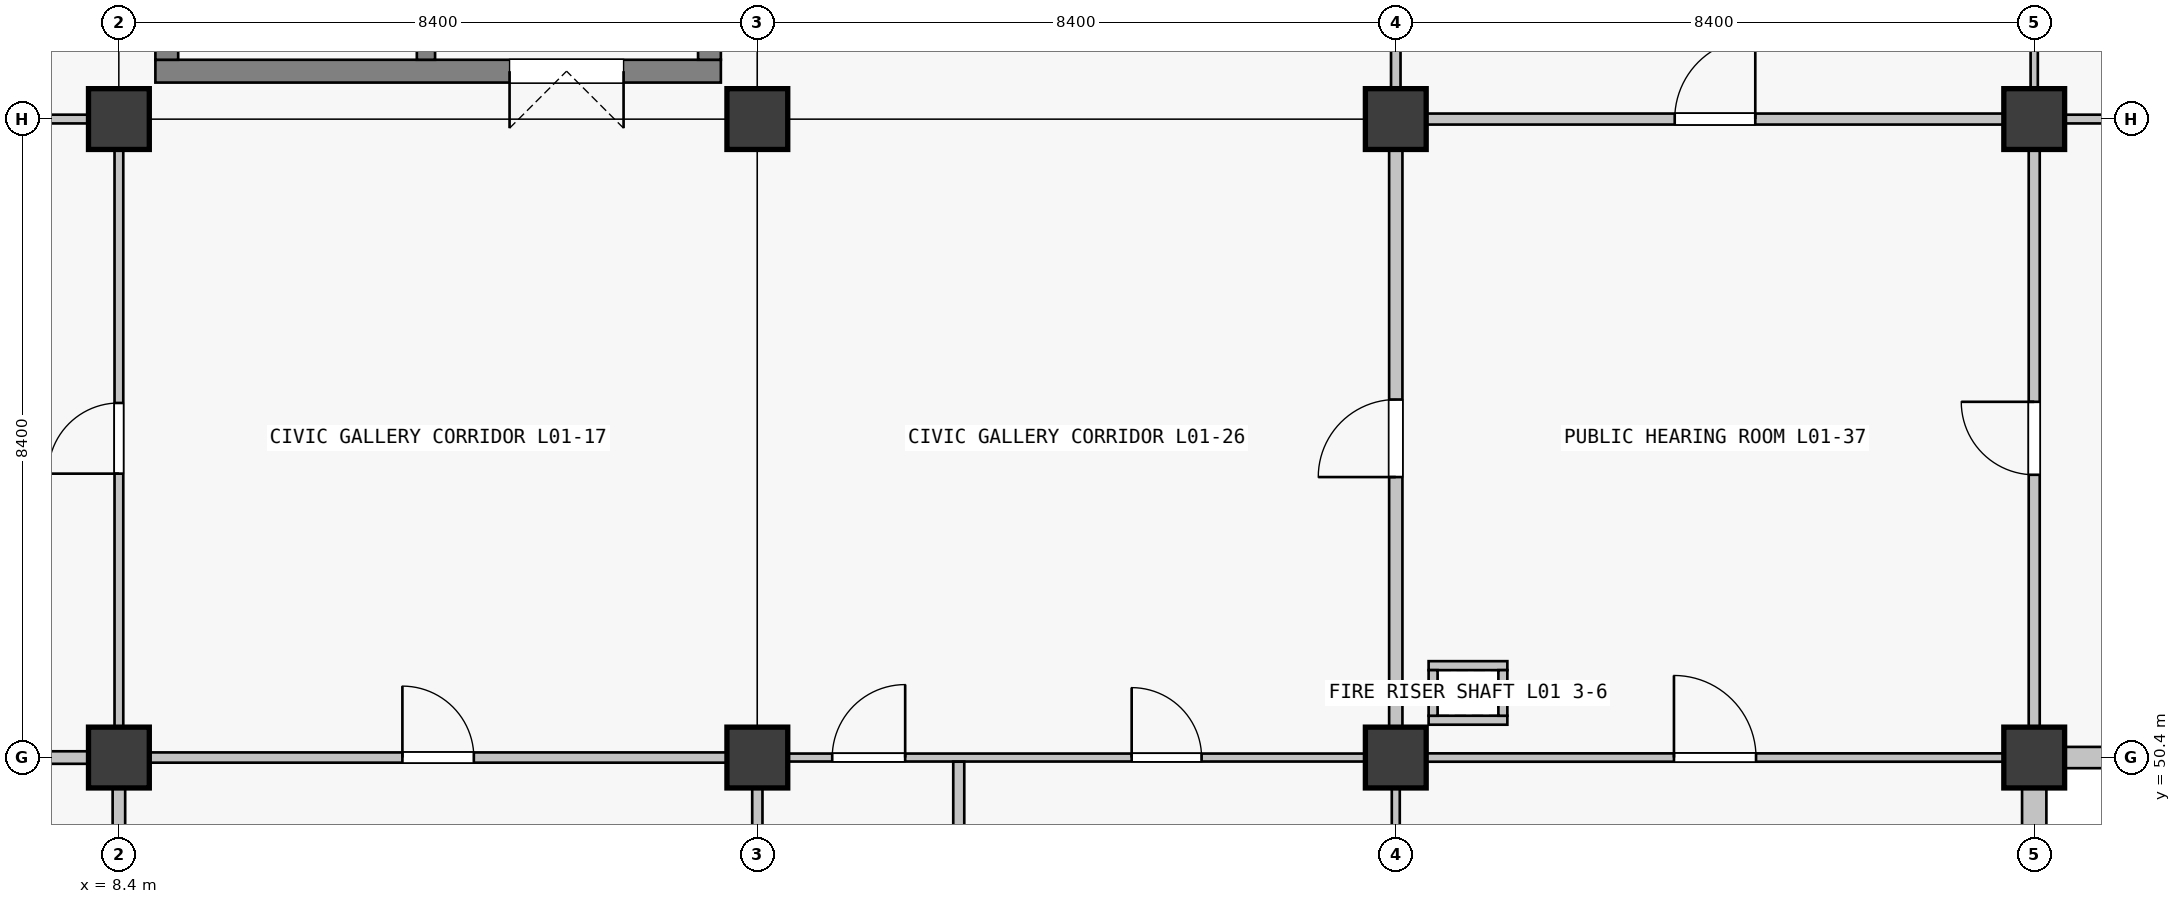
"""IFC4 building model, lengths in metres.
Left out: names, types, materials, properties, quantities, classifications, styles, units other than length and angle.
Written with IfcOpenShell. Run it as: python <this file> out.ifc"""

import sys

from ifc_helpers import new_model, si_unit, direction, frame, frame_2d, origin, origin_2d, place, context, subcontext, project, spatial, rectangle, extrude, element, fill, save


model = new_model("IFC4")
c1 = context("Model", 3, precision=1e-05, world=origin(), true_north=direction((0.0, 1.0)))
c2 = subcontext(c1, "Body", "Model", "MODEL_VIEW")
j1 = project(units=[si_unit("LENGTHUNIT", "METRE"), si_unit("PLANEANGLEUNIT", "RADIAN")], contexts=[c1])
p1 = place(None, origin())
s1 = spatial("IfcSite", under=j1, at=p1, CompositionType="ELEMENT")
p2 = place(p1, origin())
s2 = spatial("IfcBuilding", under=s1, at=p2, CompositionType="ELEMENT")
p3 = place(p2, frame((0.0, 0.0, 5.76)))
s3 = spatial("IfcBuildingStorey", under=s2, at=p3, CompositionType="ELEMENT", Elevation=5.76)
for number, where, z_axis, x_axis in (
    (1, (8.4, 50.4, 0.0), (0.0, 0.0, 1.0), (1.0, 0.0, 0.0)),
    (2, (8.4, 58.8, 0.0), (0.0, 0.0, 1.0), (1.0, 0.0, 0.0)),
    (3, (16.8, 50.4, 0.0), (0.0, 0.0, 1.0), (1.0, 0.0, 0.0)),
    (4, (16.8, 58.8, 0.0), (0.0, 0.0, 1.0), (1.0, 0.0, 0.0)),
    (5, (25.2, 50.4, 0.0), (0.0, 0.0, 1.0), (1.0, 0.0, 0.0)),
    (6, (25.2, 58.8, 0.0), (0.0, 0.0, 1.0), (1.0, 0.0, 0.0)),
    (7, (33.6, 50.4, 0.0), (0.0, 0.0, 1.0), (1.0, 0.0, 0.0)),
    (8, (33.6, 58.8, 0.0), (0.0, 0.0, 1.0), (1.0, 0.0, 0.0)),
):
    element("IfcColumn", number, at=place(p3, frame(where, z_axis=z_axis, x_axis=x_axis)), inside=s3, PredefinedType="COLUMN", context=c2, shape_type="SweptSolid", body=[
        extrude(rectangle(XDim=0.8, YDim=0.8, at=origin_2d()), origin(), (0.0, 0.0, 1.0), 4.5),
    ])
p4 = place(p3, frame((33.6, 49.999, 0.0), z_axis=(0.0, 0.0, 1.0), x_axis=(0.0, -1.0, 0.0)))
e9 = element("IfcWall", 9, at=p4, inside=s3, PredefinedType="SOLIDWALL", context=c2, shape_type="SweptSolid", body=[
    extrude(rectangle(XDim=7.598, YDim=0.32, at=frame_2d((3.799, 0.0))), origin(), (0.0, 0.0, 1.0), 3.4),
])
p5 = place(p4, frame((2.924, 0.0, 0.9)))
e10 = element("IfcOpeningElement", 10, at=p5, cuts=e9, PredefinedType="OPENING", context=c2, shape_type="SweptSolid", body=[
    extrude(rectangle(XDim=1.75, YDim=1.95, at=frame_2d((0.875, 0.975))), frame((0.0, 0.16, 0.0), z_axis=(0.0, -1.0, 0.0), x_axis=(1.0, 0.0, 0.0)), (0.0, 0.0, 1.0), 0.32),
])
p6 = place(p3, frame((41.649, 50.4, 0.0), z_axis=(0.0, 0.0, 1.0), x_axis=(-1.0, 0.0, 0.0)))
e11 = element("IfcWall", 11, at=p6, inside=s3, PredefinedType="SOLIDWALL", context=c2, shape_type="SweptSolid", body=[
    extrude(rectangle(XDim=7.648, YDim=0.28, at=frame_2d((3.824, 0.0))), origin(), (0.0, 0.0, 1.0), 3.4),
])
p7 = place(p3, frame((16.32, 59.43, 0.0), z_axis=(0.0, 0.0, 1.0), x_axis=(-1.0, 0.0, 0.0)))
e12 = element("IfcWall", 12, at=p7, inside=s3, PredefinedType="SHEAR", context=c2, shape_type="SweptSolid", body=[
    extrude(rectangle(XDim=7.44, YDim=0.3, at=frame_2d((3.72, 0.0))), origin(), (0.0, 0.0, 1.0), 4.5),
])
p8 = place(p7, frame((1.28, 0.0, 0.0)))
e13 = element("IfcOpeningElement", 13, at=p8, cuts=e12, PredefinedType="OPENING", context=c2, shape_type="SweptSolid", body=[
    extrude(rectangle(XDim=1.5, YDim=2.15, at=frame_2d((0.75, 1.075))), frame((0.0, 0.15, 0.0), z_axis=(0.0, -1.0, 0.0), x_axis=(1.0, 0.0, 0.0)), (0.0, 0.0, 1.0), 0.3),
])
for number, where, z_axis, x_axis in (
    (14, (9.03, 59.58, 0.0), (0.0, 0.0, 1.0), (0.0, 1.0, 0.0)),
    (15, (16.17, 66.42, 0.0), (0.0, 0.0, 1.0), (0.0, -1.0, 0.0)),
):
    element("IfcWall", number, at=place(p3, frame(where, z_axis=z_axis, x_axis=x_axis)), inside=s3, PredefinedType="SHEAR", context=c2, shape_type="SweptSolid", body=[
        extrude(rectangle(XDim=6.84, YDim=0.3, at=frame_2d((3.42, 0.0))), origin(), (0.0, 0.0, 1.0), 4.5),
    ])
p9 = place(p3, frame((12.44, 59.58, 0.0), z_axis=(0.0, 0.0, 1.0), x_axis=(0.0, 1.0, 0.0)))
e16 = element("IfcWall", 16, at=p9, inside=s3, PredefinedType="SHEAR", context=c2, shape_type="SweptSolid", body=[
    extrude(rectangle(XDim=6.84, YDim=0.24, at=frame_2d((3.42, 0.0))), origin(), (0.0, 0.0, 1.0), 4.5),
])
p10 = place(p9, frame((0.12, 0.0, 0.0)))
e17 = element("IfcOpeningElement", 17, at=p10, cuts=e16, PredefinedType="OPENING", context=c2, shape_type="SweptSolid", body=[
    extrude(rectangle(XDim=1.0, YDim=2.15, at=frame_2d((0.5, 1.075))), frame((0.0, 0.12, 0.0), z_axis=(0.0, -1.0, 0.0), x_axis=(1.0, 0.0, 0.0)), (0.0, 0.0, 1.0), 0.24),
])
for number, where, z_axis, x_axis in (
    (18, (25.632, 50.891, 0.0), (0.0, 0.0, 1.0), (1.0, 0.0, 0.0)),
    (19, (25.632, 51.609, 0.0), (0.0, 0.0, 1.0), (1.0, 0.0, 0.0)),
):
    element("IfcWall", number, at=place(p3, frame(where, z_axis=z_axis, x_axis=x_axis)), inside=s3, PredefinedType="PARTITIONING", context=c2, shape_type="SweptSolid", body=[
        extrude(rectangle(XDim=1.036, YDim=0.118, at=frame_2d((0.518, 0.0))), origin(), (0.0, 0.0, 1.0), 3.48),
    ])
for number, where, z_axis, x_axis in (
    (20, (25.691, 50.95, 0.0), (0.0, 0.0, 1.0), (0.0, 1.0, 0.0)),
    (21, (26.609, 50.95, 0.0), (0.0, 0.0, 1.0), (0.0, 1.0, 0.0)),
):
    element("IfcWall", number, at=place(p3, frame(where, z_axis=z_axis, x_axis=x_axis)), inside=s3, PredefinedType="PARTITIONING", context=c2, shape_type="SweptSolid", body=[
        extrude(rectangle(XDim=0.6, YDim=0.118, at=frame_2d((0.3, 0.0))), origin(), (0.0, 0.0, 1.0), 3.48),
    ])
p11 = place(p3, frame((0.277, 50.4, 0.0), z_axis=(0.0, 0.0, 1.0), x_axis=(1.0, 0.0, 0.0)))
e22 = element("IfcWall", 22, at=p11, inside=s3, PredefinedType="PARTITIONING", context=c2, shape_type="SweptSolid", body=[
    extrude(rectangle(XDim=7.721, YDim=0.165, at=frame_2d((3.86, 0.0))), origin(), (0.0, 0.0, 1.0), 2.4),
])
p12 = place(p11, frame((3.376, 0.0, 0.0)))
e23 = element("IfcOpeningElement", 23, at=p12, cuts=e22, PredefinedType="OPENING", context=c2, shape_type="SweptSolid", body=[
    extrude(rectangle(XDim=0.97, YDim=2.12, at=frame_2d((0.485, 1.06))), frame((0.0, 0.083, 0.0), z_axis=(0.0, -1.0, 0.0), x_axis=(1.0, 0.0, 0.0)), (0.0, 0.0, 1.0), 0.165),
])
p13 = place(p3, frame((0.277, 58.8, 0.0), z_axis=(0.0, 0.0, 1.0), x_axis=(1.0, 0.0, 0.0)))
e24 = element("IfcWall", 24, at=p13, inside=s3, PredefinedType="PARTITIONING", context=c2, shape_type="SweptSolid", body=[
    extrude(rectangle(XDim=7.721, YDim=0.115, at=frame_2d((3.86, 0.0))), origin(), (0.0, 0.0, 1.0), 2.4),
])
p14 = place(p13, frame((3.361, 0.0, 0.0)))
e25 = element("IfcOpeningElement", 25, at=p14, cuts=e24, PredefinedType="OPENING", context=c2, shape_type="SweptSolid", body=[
    extrude(rectangle(XDim=1.0, YDim=2.2, at=frame_2d((0.5, 1.1))), frame((0.0, 0.058, 0.0), z_axis=(0.0, -1.0, 0.0), x_axis=(1.0, 0.0, 0.0)), (0.0, 0.0, 1.0), 0.115),
])
p15 = place(p3, frame((8.802, 50.4, 0.0), z_axis=(0.0, 0.0, 1.0), x_axis=(1.0, 0.0, 0.0)))
e26 = element("IfcWall", 26, at=p15, inside=s3, PredefinedType="PARTITIONING", context=c2, shape_type="SweptSolid", body=[
    extrude(rectangle(XDim=7.596, YDim=0.135, at=frame_2d((3.798, 0.0))), origin(), (0.0, 0.0, 1.0), 2.4),
])
p16 = place(p15, frame((3.328, 0.0, 0.0)))
e27 = element("IfcOpeningElement", 27, at=p16, cuts=e26, PredefinedType="OPENING", context=c2, shape_type="SweptSolid", body=[
    extrude(rectangle(XDim=0.94, YDim=2.15, at=frame_2d((0.47, 1.075))), frame((0.0, 0.067, 0.0), z_axis=(0.0, -1.0, 0.0), x_axis=(1.0, 0.0, 0.0)), (0.0, 0.0, 1.0), 0.135),
])
p17 = place(p3, frame((17.202, 50.4, 0.0), z_axis=(0.0, 0.0, 1.0), x_axis=(1.0, 0.0, 0.0)))
e28 = element("IfcWall", 28, at=p17, inside=s3, PredefinedType="PARTITIONING", context=c2, shape_type="SweptSolid", body=[
    extrude(rectangle(XDim=7.596, YDim=0.105, at=frame_2d((3.798, 0.0))), origin(), (0.0, 0.0, 1.0), 2.4),
])
p18 = place(p17, frame((0.583, 0.0, 0.0)))
e29 = element("IfcOpeningElement", 29, at=p18, cuts=e28, PredefinedType="OPENING", context=c2, shape_type="SweptSolid", body=[
    extrude(rectangle(XDim=0.96, YDim=2.1, at=frame_2d((0.48, 1.05))), frame((0.0, 0.052, 0.0), z_axis=(0.0, -1.0, 0.0), x_axis=(1.0, 0.0, 0.0)), (0.0, 0.0, 1.0), 0.105),
])
p19 = place(p17, frame((4.523, 0.0, 0.0)))
e30 = element("IfcOpeningElement", 30, at=p19, cuts=e28, PredefinedType="OPENING", context=c2, shape_type="SweptSolid", body=[
    extrude(rectangle(XDim=0.92, YDim=2.1, at=frame_2d((0.46, 1.05))), frame((0.0, 0.052, 0.0), z_axis=(0.0, -1.0, 0.0), x_axis=(1.0, 0.0, 0.0)), (0.0, 0.0, 1.0), 0.105),
])
p20 = place(p3, frame((25.602, 50.4, 0.0), z_axis=(0.0, 0.0, 1.0), x_axis=(1.0, 0.0, 0.0)))
e31 = element("IfcWall", 31, at=p20, inside=s3, PredefinedType="MOVABLE", context=c2, shape_type="SweptSolid", body=[
    extrude(rectangle(XDim=7.596, YDim=0.11, at=frame_2d((3.798, 0.0))), origin(), (0.0, 0.0, 1.0), 2.4),
])
p21 = place(p20, frame((3.258, 0.0, 0.0)))
e32 = element("IfcOpeningElement", 32, at=p21, cuts=e31, PredefinedType="OPENING", context=c2, shape_type="SweptSolid", body=[
    extrude(rectangle(XDim=1.08, YDim=2.22, at=frame_2d((0.54, 1.11))), frame((0.0, 0.055, 0.0), z_axis=(0.0, -1.0, 0.0), x_axis=(1.0, 0.0, 0.0)), (0.0, 0.0, 1.0), 0.11),
])
p22 = place(p3, frame((25.602, 58.8, 0.0), z_axis=(0.0, 0.0, 1.0), x_axis=(1.0, 0.0, 0.0)))
e33 = element("IfcWall", 33, at=p22, inside=s3, PredefinedType="PARTITIONING", context=c2, shape_type="SweptSolid", body=[
    extrude(rectangle(XDim=7.596, YDim=0.145, at=frame_2d((3.798, 0.0))), origin(), (0.0, 0.0, 1.0), 2.4),
])
p23 = place(p22, frame((3.268, 0.0, 0.0)))
e34 = element("IfcOpeningElement", 34, at=p23, cuts=e33, PredefinedType="OPENING", context=c2, shape_type="SweptSolid", body=[
    extrude(rectangle(XDim=1.06, YDim=2.22, at=frame_2d((0.53, 1.11))), frame((0.0, 0.073, 0.0), z_axis=(0.0, -1.0, 0.0), x_axis=(1.0, 0.0, 0.0)), (0.0, 0.0, 1.0), 0.145),
])
p24 = place(p3, frame((34.002, 58.8, 0.0), z_axis=(0.0, 0.0, 1.0), x_axis=(1.0, 0.0, 0.0)))
e35 = element("IfcWall", 35, at=p24, inside=s3, PredefinedType="PARTITIONING", context=c2, shape_type="SweptSolid", body=[
    extrude(rectangle(XDim=7.621, YDim=0.115, at=frame_2d((3.811, 0.0))), origin(), (0.0, 0.0, 1.0), 2.4),
])
p25 = place(p24, frame((3.28, 0.0, 0.0)))
e36 = element("IfcOpeningElement", 36, at=p25, cuts=e35, PredefinedType="OPENING", context=c2, shape_type="SweptSolid", body=[
    extrude(rectangle(XDim=1.06, YDim=2.22, at=frame_2d((0.53, 1.11))), frame((0.0, 0.058, 0.0), z_axis=(0.0, -1.0, 0.0), x_axis=(1.0, 0.0, 0.0)), (0.0, 0.0, 1.0), 0.115),
])
p26 = place(p3, frame((8.4, 42.402, 0.0), z_axis=(0.0, 0.0, 1.0), x_axis=(0.0, 1.0, 0.0)))
e37 = element("IfcWall", 37, at=p26, inside=s3, PredefinedType="PARTITIONING", context=c2, shape_type="SweptSolid", body=[
    extrude(rectangle(XDim=7.596, YDim=0.165, at=frame_2d((3.798, 0.0))), origin(), (0.0, 0.0, 1.0), 2.4),
])
p27 = place(p26, frame((3.318, 0.0, 0.0)))
e38 = element("IfcOpeningElement", 38, at=p27, cuts=e37, PredefinedType="OPENING", context=c2, shape_type="SweptSolid", body=[
    extrude(rectangle(XDim=0.96, YDim=2.18, at=frame_2d((0.48, 1.09))), frame((0.0, 0.083, 0.0), z_axis=(0.0, -1.0, 0.0), x_axis=(1.0, 0.0, 0.0)), (0.0, 0.0, 1.0), 0.165),
])
p28 = place(p3, frame((8.4, 50.802, 0.0), z_axis=(0.0, 0.0, 1.0), x_axis=(0.0, 1.0, 0.0)))
e39 = element("IfcWall", 39, at=p28, inside=s3, PredefinedType="PARTITIONING", context=c2, shape_type="SweptSolid", body=[
    extrude(rectangle(XDim=7.596, YDim=0.115, at=frame_2d((3.798, 0.0))), origin(), (0.0, 0.0, 1.0), 2.4),
])
p29 = place(p28, frame((3.333, 0.0, 0.0)))
e40 = element("IfcOpeningElement", 40, at=p29, cuts=e39, PredefinedType="OPENING", context=c2, shape_type="SweptSolid", body=[
    extrude(rectangle(XDim=0.93, YDim=2.12, at=frame_2d((0.465, 1.06))), frame((0.0, 0.058, 0.0), z_axis=(0.0, -1.0, 0.0), x_axis=(1.0, 0.0, 0.0)), (0.0, 0.0, 1.0), 0.115),
])
p30 = place(p3, frame((16.8, 42.402, 0.0), z_axis=(0.0, 0.0, 1.0), x_axis=(0.0, 1.0, 0.0)))
e41 = element("IfcWall", 41, at=p30, inside=s3, PredefinedType="PARTITIONING", context=c2, shape_type="SweptSolid", body=[
    extrude(rectangle(XDim=7.596, YDim=0.135, at=frame_2d((3.798, 0.0))), origin(), (0.0, 0.0, 1.0), 2.4),
])
p31 = place(p3, frame((25.2, 42.402, 0.0), z_axis=(0.0, 0.0, 1.0), x_axis=(0.0, 1.0, 0.0)))
e42 = element("IfcWall", 42, at=p31, inside=s3, PredefinedType="PARTITIONING", context=c2, shape_type="SweptSolid", body=[
    extrude(rectangle(XDim=7.596, YDim=0.105, at=frame_2d((3.798, 0.0))), origin(), (0.0, 0.0, 1.0), 2.4),
])
p32 = place(p3, frame((25.2, 50.802, 0.0), z_axis=(0.0, 0.0, 1.0), x_axis=(0.0, 1.0, 0.0)))
e43 = element("IfcWall", 43, at=p32, inside=s3, PredefinedType="PARTITIONING", context=c2, shape_type="SweptSolid", body=[
    extrude(rectangle(XDim=7.596, YDim=0.175, at=frame_2d((3.798, 0.0))), origin(), (0.0, 0.0, 1.0), 2.4),
])
p33 = place(p32, frame((3.288, 0.0, 0.0)))
e44 = element("IfcOpeningElement", 44, at=p33, cuts=e43, PredefinedType="OPENING", context=c2, shape_type="SweptSolid", body=[
    extrude(rectangle(XDim=1.02, YDim=2.2, at=frame_2d((0.51, 1.1))), frame((0.0, 0.087, 0.0), z_axis=(0.0, -1.0, 0.0), x_axis=(1.0, 0.0, 0.0)), (0.0, 0.0, 1.0), 0.175),
])
p34 = place(p3, frame((25.2, 59.202, 0.0), z_axis=(0.0, 0.0, 1.0), x_axis=(0.0, 1.0, 0.0)))
e45 = element("IfcWall", 45, at=p34, inside=s3, PredefinedType="PARTITIONING", context=c2, shape_type="SweptSolid", body=[
    extrude(rectangle(XDim=7.596, YDim=0.125, at=frame_2d((3.798, 0.0))), origin(), (0.0, 0.0, 1.0), 2.4),
])
p35 = place(p34, frame((3.298, 0.0, 0.0)))
e46 = element("IfcOpeningElement", 46, at=p35, cuts=e45, PredefinedType="OPENING", context=c2, shape_type="SweptSolid", body=[
    extrude(rectangle(XDim=1.0, YDim=2.2, at=frame_2d((0.5, 1.1))), frame((0.0, 0.062, 0.0), z_axis=(0.0, -1.0, 0.0), x_axis=(1.0, 0.0, 0.0)), (0.0, 0.0, 1.0), 0.125),
])
p36 = place(p3, frame((33.6, 50.802, 0.0), z_axis=(0.0, 0.0, 1.0), x_axis=(0.0, 1.0, 0.0)))
e47 = element("IfcWall", 47, at=p36, inside=s3, PredefinedType="PARTITIONING", context=c2, shape_type="SweptSolid", body=[
    extrude(rectangle(XDim=7.596, YDim=0.145, at=frame_2d((3.798, 0.0))), origin(), (0.0, 0.0, 1.0), 2.4),
])
p37 = place(p36, frame((3.318, 0.0, 0.0)))
e48 = element("IfcOpeningElement", 48, at=p37, cuts=e47, PredefinedType="OPENING", context=c2, shape_type="SweptSolid", body=[
    extrude(rectangle(XDim=0.96, YDim=2.18, at=frame_2d((0.48, 1.09))), frame((0.0, 0.073, 0.0), z_axis=(0.0, -1.0, 0.0), x_axis=(1.0, 0.0, 0.0)), (0.0, 0.0, 1.0), 0.145),
])
p38 = place(p3, frame((33.6, 59.202, 0.0), z_axis=(0.0, 0.0, 1.0), x_axis=(0.0, 1.0, 0.0)))
e49 = element("IfcWall", 49, at=p38, inside=s3, PredefinedType="PARTITIONING", context=c2, shape_type="SweptSolid", body=[
    extrude(rectangle(XDim=7.596, YDim=0.095, at=frame_2d((3.798, 0.0))), origin(), (0.0, 0.0, 1.0), 2.4),
])
p39 = place(p38, frame((3.308, 0.0, 0.0)))
e50 = element("IfcOpeningElement", 50, at=p39, cuts=e49, PredefinedType="OPENING", context=c2, shape_type="SweptSolid", body=[
    extrude(rectangle(XDim=0.98, YDim=2.18, at=frame_2d((0.49, 1.09))), frame((0.0, 0.047, 0.0), z_axis=(0.0, -1.0, 0.0), x_axis=(1.0, 0.0, 0.0)), (0.0, 0.0, 1.0), 0.095),
])
p40 = place(p3, frame((19.45, 42.08, 0.0), z_axis=(0.0, 0.0, 1.0), x_axis=(0.0, 1.0, 0.0)))
e51 = element("IfcWall", 51, at=p40, inside=s3, PredefinedType="PARTITIONING", context=c2, shape_type="SweptSolid", body=[
    extrude(rectangle(XDim=8.266, YDim=0.145, at=frame_2d((4.133, 0.0))), origin(), (0.0, 0.0, 1.0), 2.4),
])
p41 = place(p8, origin())
e52 = element("IfcDoor", 52, at=p41, inside=s3, OperationType="DOUBLE_DOOR_SINGLE_SWING", PredefinedType="DOOR", context=c2, shape_type="SweptSolid", body=[
    extrude(rectangle(XDim=1.5, YDim=2.15, at=frame_2d((0.75, 1.075))), frame((0.0, 0.025, 0.0), z_axis=(0.0, -1.0, 0.0), x_axis=(1.0, 0.0, 0.0)), (0.0, 0.0, 1.0), 0.05),
])
fill(e13, e52)
p42 = place(p18, origin())
e53 = element("IfcDoor", 53, at=p42, inside=s3, OperationType="SINGLE_SWING_RIGHT", PredefinedType="DOOR", context=c2, shape_type="SweptSolid", body=[
    extrude(rectangle(XDim=0.96, YDim=2.1, at=frame_2d((0.48, 1.05))), frame((0.0, 0.025, 0.0), z_axis=(0.0, -1.0, 0.0), x_axis=(1.0, 0.0, 0.0)), (0.0, 0.0, 1.0), 0.05),
])
fill(e29, e53)
p43 = place(p19, origin())
e54 = element("IfcDoor", 54, at=p43, inside=s3, OperationType="SINGLE_SWING_LEFT", PredefinedType="DOOR", context=c2, shape_type="SweptSolid", body=[
    extrude(rectangle(XDim=0.92, YDim=2.1, at=frame_2d((0.46, 1.05))), frame((0.0, 0.025, 0.0), z_axis=(0.0, -1.0, 0.0), x_axis=(1.0, 0.0, 0.0)), (0.0, 0.0, 1.0), 0.05),
])
fill(e30, e54)
p44 = place(p16, origin())
e55 = element("IfcDoor", 55, at=p44, inside=s3, OperationType="SINGLE_SWING_LEFT", PredefinedType="DOOR", context=c2, shape_type="SweptSolid", body=[
    extrude(rectangle(XDim=0.94, YDim=2.15, at=frame_2d((0.47, 1.075))), frame((0.0, 0.025, 0.0), z_axis=(0.0, -1.0, 0.0), x_axis=(1.0, 0.0, 0.0)), (0.0, 0.0, 1.0), 0.05),
])
fill(e27, e55)
p45 = place(p29, origin())
e56 = element("IfcDoor", 56, at=p45, inside=s3, OperationType="SINGLE_SWING_LEFT", PredefinedType="DOOR", context=c2, shape_type="SweptSolid", body=[
    extrude(rectangle(XDim=0.93, YDim=2.12, at=frame_2d((0.465, 1.06))), frame((0.0, 0.025, 0.0), z_axis=(0.0, -1.0, 0.0), x_axis=(1.0, 0.0, 0.0)), (0.0, 0.0, 1.0), 0.05),
])
fill(e40, e56)
p46 = place(p33, origin())
e57 = element("IfcDoor", 57, at=p46, inside=s3, OperationType="SINGLE_SWING_LEFT", PredefinedType="DOOR", context=c2, shape_type="SweptSolid", body=[
    extrude(rectangle(XDim=1.02, YDim=2.2, at=frame_2d((0.51, 1.1))), frame((0.0, 0.025, 0.0), z_axis=(0.0, -1.0, 0.0), x_axis=(1.0, 0.0, 0.0)), (0.0, 0.0, 1.0), 0.05),
])
fill(e44, e57)
p47 = place(p37, origin())
e58 = element("IfcDoor", 58, at=p47, inside=s3, OperationType="SINGLE_SWING_RIGHT", PredefinedType="DOOR", context=c2, shape_type="SweptSolid", body=[
    extrude(rectangle(XDim=0.96, YDim=2.18, at=frame_2d((0.48, 1.09))), frame((0.0, 0.025, 0.0), z_axis=(0.0, -1.0, 0.0), x_axis=(1.0, 0.0, 0.0)), (0.0, 0.0, 1.0), 0.05),
])
fill(e48, e58)
p48 = place(p21, origin())
e59 = element("IfcDoor", 59, at=p48, inside=s3, OperationType="SINGLE_SWING_LEFT", PredefinedType="DOOR", context=c2, shape_type="SweptSolid", body=[
    extrude(rectangle(XDim=1.08, YDim=2.22, at=frame_2d((0.54, 1.11))), frame((0.0, 0.025, 0.0), z_axis=(0.0, -1.0, 0.0), x_axis=(1.0, 0.0, 0.0)), (0.0, 0.0, 1.0), 0.05),
])
fill(e32, e59)
p49 = place(p23, origin())
e60 = element("IfcDoor", 60, at=p49, inside=s3, OperationType="SINGLE_SWING_RIGHT", PredefinedType="DOOR", context=c2, shape_type="SweptSolid", body=[
    extrude(rectangle(XDim=1.06, YDim=2.22, at=frame_2d((0.53, 1.11))), frame((0.0, 0.025, 0.0), z_axis=(0.0, -1.0, 0.0), x_axis=(1.0, 0.0, 0.0)), (0.0, 0.0, 1.0), 0.05),
])
fill(e34, e60)
save(model, sys.argv[1])
